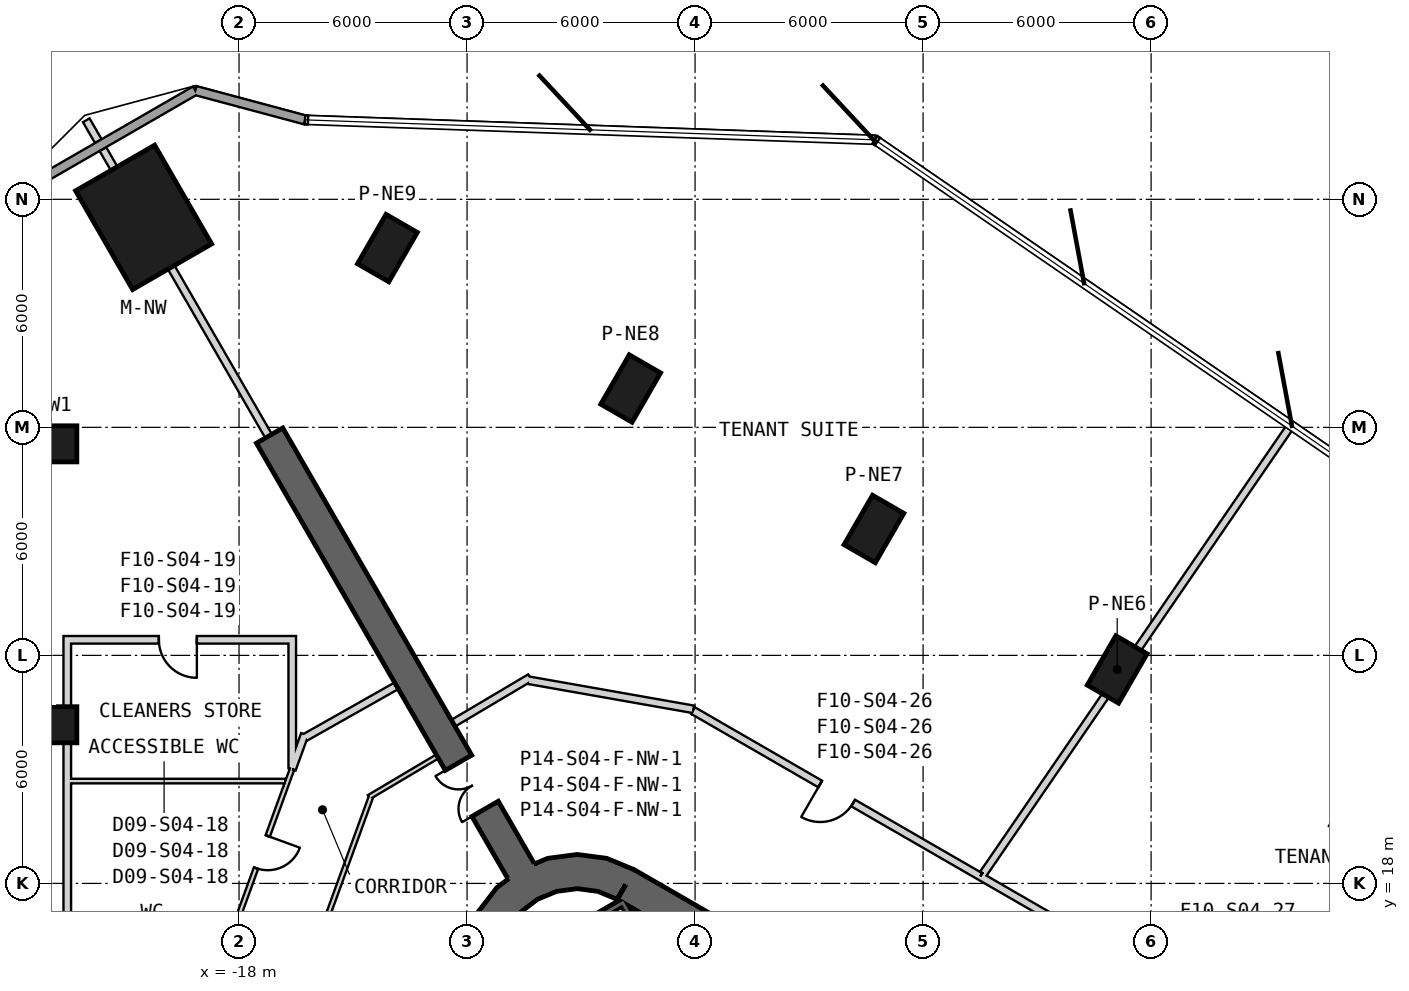
"""IFC4 building model, lengths in metres.
Left out: names, types, materials, properties, quantities, classifications, styles, units other than length and angle.
Written with IfcOpenShell. Run it as: python <this file> out.ifc"""

import sys

from ifc_helpers import new_model, si_unit, direction, frame, frame_2d, origin, origin_2d, place, context, subcontext, project, spatial, polyline, rectangle, outline, extrude, element, fill, save


model = new_model("IFC4")
c1 = context("Model", 3, precision=1e-05, world=origin(), true_north=direction((0.0, 1.0)))
c2 = subcontext(c1, "Body", "Model", "MODEL_VIEW")
j1 = project(units=[si_unit("LENGTHUNIT", "METRE"), si_unit("PLANEANGLEUNIT", "RADIAN")], contexts=[c1])
p1 = place(None, origin())
s1 = spatial("IfcSite", under=j1, at=p1, CompositionType="ELEMENT")
p2 = place(p1, origin())
s2 = spatial("IfcBuilding", under=s1, at=p2, CompositionType="ELEMENT")
p3 = place(p2, frame((0.0, 0.0, 94.7)))
s3 = spatial("IfcBuildingStorey", under=s2, at=p3, CompositionType="ELEMENT", Elevation=94.7)
p4 = place(p3, frame((-20.51, 35.525, 0.0), z_axis=(0.0, 0.0, 1.0), x_axis=(-0.5, 0.866025403784, 0.0)))
e1 = element("IfcColumn", 1, at=p4, inside=s3, PredefinedType="COLUMN", context=c2, shape_type="SweptSolid", body=[
    extrude(rectangle(XDim=3.0, YDim=2.4, at=origin_2d()), origin(), (0.0, 0.0, 1.0), 4.1),
])
for number, where, z_axis, x_axis in (
    (2, (-23.018, 29.566, 0.0), (0.0, 0.0, 1.0), (-1.0, 0.0, 0.0)),
    (3, (-23.018, 22.174, 0.0), (0.0, 0.0, 1.0), (-1.0, 0.0, 0.0)),
    (4, (5.108, 23.63, 0.0), (0.0, 0.0, 1.0), (0.5, 0.866, 0.0)),
    (5, (-1.293, 27.326, 0.0), (0.0, 0.0, 1.0), (0.5, 0.866, 0.0)),
    (6, (-7.695, 31.021, 0.0), (0.0, 0.0, 1.0), (0.5, 0.866, 0.0)),
    (7, (-14.096, 34.717, 0.0), (0.0, 0.0, 1.0), (0.5, 0.866, 0.0)),
):
    element("IfcColumn", number, at=place(p3, frame(where, z_axis=z_axis, x_axis=x_axis)), inside=s3, PredefinedType="COLUMN", context=c2, shape_type="SweptSolid", body=[
        extrude(rectangle(XDim=1.5, YDim=0.95, at=origin_2d()), origin(), (0.0, 0.0, 1.0), 4.1),
    ])
p5 = place(p3, frame((19.475, 2.208, 0.0), z_axis=(0.0, 0.0, 1.0), x_axis=(-0.866028369851, 0.499994862586, 0.0)))
e8 = element("IfcWall", 8, at=p5, inside=s3, PredefinedType="SHEAR", context=c2, shape_type="SweptSolid", body=[
    extrude(rectangle(XDim=31.523, YDim=0.9, at=frame_2d((15.762, 0.0))), origin(), (0.0, 0.0, 1.0), 4.1),
])
p6 = place(p5, frame((7.062, 0.0, 0.0)))
e9 = element("IfcOpeningElement", 9, at=p6, cuts=e8, PredefinedType="OPENING", context=c2, shape_type="SweptSolid", body=[
    extrude(rectangle(XDim=1.2, YDim=2.4, at=frame_2d((0.6, 1.2))), frame((0.0, 0.46, 0.0), z_axis=(0.0, -1.0, 0.0), x_axis=(1.0, 0.0, 0.0)), (0.0, 0.0, 1.0), 0.92),
])
p7 = place(p5, frame((9.762, 0.0, 0.0)))
e10 = element("IfcOpeningElement", 10, at=p7, cuts=e8, PredefinedType="OPENING", context=c2, shape_type="SweptSolid", body=[
    extrude(rectangle(XDim=1.2, YDim=2.4, at=frame_2d((0.6, 1.2))), frame((0.0, 0.46, 0.0), z_axis=(0.0, -1.0, 0.0), x_axis=(1.0, 0.0, 0.0)), (0.0, 0.0, 1.0), 0.92),
])
p8 = place(p5, frame((12.462, 0.0, 0.0)))
e11 = element("IfcOpeningElement", 11, at=p8, cuts=e8, PredefinedType="OPENING", context=c2, shape_type="SweptSolid", body=[
    extrude(rectangle(XDim=1.2, YDim=2.4, at=frame_2d((0.6, 1.2))), frame((0.0, 0.46, 0.0), z_axis=(0.0, -1.0, 0.0), x_axis=(1.0, 0.0, 0.0)), (0.0, 0.0, 1.0), 0.92),
])
p9 = place(p5, frame((15.162, 0.0, 0.0)))
e12 = element("IfcOpeningElement", 12, at=p9, cuts=e8, PredefinedType="OPENING", context=c2, shape_type="SweptSolid", body=[
    extrude(rectangle(XDim=1.2, YDim=2.4, at=frame_2d((0.6, 1.2))), frame((0.0, 0.46, 0.0), z_axis=(0.0, -1.0, 0.0), x_axis=(1.0, 0.0, 0.0)), (0.0, 0.0, 1.0), 0.92),
])
p10 = place(p5, frame((17.862, 0.0, 0.0)))
e13 = element("IfcOpeningElement", 13, at=p10, cuts=e8, PredefinedType="OPENING", context=c2, shape_type="SweptSolid", body=[
    extrude(rectangle(XDim=1.2, YDim=2.4, at=frame_2d((0.6, 1.2))), frame((0.0, 0.46, 0.0), z_axis=(0.0, -1.0, 0.0), x_axis=(1.0, 0.0, 0.0)), (0.0, 0.0, 1.0), 0.92),
])
p11 = place(p5, frame((20.562, 0.0, 0.0)))
e14 = element("IfcOpeningElement", 14, at=p11, cuts=e8, PredefinedType="OPENING", context=c2, shape_type="SweptSolid", body=[
    extrude(rectangle(XDim=1.2, YDim=2.4, at=frame_2d((0.6, 1.2))), frame((0.0, 0.46, 0.0), z_axis=(0.0, -1.0, 0.0), x_axis=(1.0, 0.0, 0.0)), (0.0, 0.0, 1.0), 0.92),
])
p12 = place(p5, frame((23.262, 0.0, 0.0)))
e15 = element("IfcOpeningElement", 15, at=p12, cuts=e8, PredefinedType="OPENING", context=c2, shape_type="SweptSolid", body=[
    extrude(rectangle(XDim=1.2, YDim=2.4, at=frame_2d((0.6, 1.2))), frame((0.0, 0.46, 0.0), z_axis=(0.0, -1.0, 0.0), x_axis=(1.0, 0.0, 0.0)), (0.0, 0.0, 1.0), 0.92),
])
p13 = place(p5, frame((3.612, 0.0, 0.0)))
e16 = element("IfcOpeningElement", 16, at=p13, cuts=e8, PredefinedType="OPENING", context=c2, shape_type="SweptSolid", body=[
    extrude(rectangle(XDim=1.2, YDim=2.4, at=frame_2d((0.6, 1.2))), frame((0.0, 0.46, 0.0), z_axis=(0.0, -1.0, 0.0), x_axis=(1.0, 0.0, 0.0)), (0.0, 0.0, 1.0), 0.92),
])
p14 = place(p5, frame((26.712, 0.0, 0.0)))
e17 = element("IfcOpeningElement", 17, at=p14, cuts=e8, PredefinedType="OPENING", context=c2, shape_type="SweptSolid", body=[
    extrude(rectangle(XDim=1.2, YDim=2.4, at=frame_2d((0.6, 1.2))), frame((0.0, 0.46, 0.0), z_axis=(0.0, -1.0, 0.0), x_axis=(1.0, 0.0, 0.0)), (0.0, 0.0, 1.0), 0.92),
])
p15 = place(p3, origin())
e18 = element("IfcWall", 18, at=p15, inside=s3, PredefinedType="SHEAR", context=c2, shape_type="SweptSolid", body=[
    extrude(outline(polyline([(-7.6, 18.36), (-8.323, 18.659), (-9.1, 18.762), (-9.876, 18.659), (-10.6, 18.36), (-11.221, 17.883), (-11.698, 17.262), (-11.998, 16.538), (-12.1, 15.762), (-11.2, 15.762), (-11.128, 16.305), (-10.919, 16.812), (-10.585, 17.247), (-10.15, 17.58), (-9.644, 17.79), (-9.1, 17.862), (-8.556, 17.79), (-8.05, 17.58), (-7.6, 18.36)])), origin(), (0.0, 0.0, 1.0), 4.1),
])
p16 = place(p3, frame((-10.575, 18.316, 0.0), z_axis=(0.0, 0.0, 1.0), x_axis=(-0.500006018292, 0.866021929094, 0.0)))
e19 = element("IfcWall", 19, at=p16, inside=s3, PredefinedType="SHEAR", context=c2, shape_type="SweptSolid", body=[
    extrude(rectangle(XDim=13.241, YDim=0.8, at=frame_2d((6.621, 0.0))), origin(), (0.0, 0.0, 1.0), 4.1),
])
p17 = place(p16, frame((1.9, 0.0, 0.0)))
e20 = element("IfcOpeningElement", 20, at=p17, cuts=e19, PredefinedType="OPENING", context=c2, shape_type="SweptSolid", body=[
    extrude(rectangle(XDim=1.4, YDim=2.4, at=frame_2d((0.7, 1.2))), frame((0.0, 0.41, 0.0), z_axis=(0.0, -1.0, 0.0), x_axis=(1.0, 0.0, 0.0)), (0.0, 0.0, 1.0), 0.82),
])
p18 = place(p3, frame((-16.263, 38.09, 0.0), z_axis=(0.0, 0.0, 1.0), x_axis=(-0.965934938286, 0.258785036271, 0.0)))
e21 = element("IfcWall", 21, at=p18, inside=s3, PredefinedType="SOLIDWALL", context=c2, shape_type="SweptSolid", body=[
    extrude(rectangle(XDim=2.991, YDim=0.24, at=frame_2d((1.496, 0.0))), origin(), (0.0, 0.0, 1.0), 3.8),
])
p19 = place(p3, frame((-19.153, 38.865, 0.0), z_axis=(0.0, 0.0, 1.0), x_axis=(-0.866024844342, -0.500000968981, 0.0)))
e22 = element("IfcWall", 22, at=p19, inside=s3, PredefinedType="SOLIDWALL", context=c2, shape_type="SweptSolid", body=[
    extrude(rectangle(XDim=5.691, YDim=0.24, at=frame_2d((2.845, 0.0))), origin(), (0.0, 0.0, 1.0), 3.8),
])
p20 = place(p3, frame((-7.818, 17.541, -0.3), z_axis=(0.0, 0.0, 1.0), x_axis=(-0.866044365799, -0.499967155389, 0.0)))
e23 = element("IfcWall", 23, at=p20, inside=s3, PredefinedType="SHEAR", context=c2, shape_type="SweptSolid", body=[
    extrude(rectangle(XDim=3.8, YDim=0.2, at=frame_2d((1.9, 0.0))), origin(), (0.0, 0.0, 1.0), 4.1),
])
p21 = place(p3, frame((-7.854, 17.405, -0.3), z_axis=(0.0, 0.0, 1.0), x_axis=(0.499997992926, -0.866026562566, 0.0)))
e24 = element("IfcWall", 24, at=p21, inside=s3, PredefinedType="SHEAR", context=c2, shape_type="SweptSolid", body=[
    extrude(rectangle(XDim=7.9, YDim=0.2, at=frame_2d((3.95, 0.0))), origin(), (0.0, 0.0, 1.0), 4.1),
])
p22 = place(p3, frame((-12.782, 21.339, 0.0), z_axis=(0.0, 0.0, 1.0), x_axis=(-0.859769901207, -0.510681619973, 0.0)))
e25 = element("IfcWall", 25, at=p22, inside=s3, PredefinedType="PARTITIONING", context=c2, shape_type="SweptSolid", body=[
    extrude(rectangle(XDim=2.093, YDim=0.12, at=frame_2d((1.046, 0.0))), origin(), (0.0, 0.0, 1.0), 3.8),
])
p23 = place(p3, frame((-14.528, 20.282, 0.0), z_axis=(0.0, 0.0, 1.0), x_axis=(-0.341969257767, -0.939711140054, 0.0)))
e26 = element("IfcWall", 26, at=p23, inside=s3, PredefinedType="PARTITIONING", context=c2, shape_type="SweptSolid", body=[
    extrude(rectangle(XDim=4.073, YDim=0.12, at=frame_2d((2.037, 0.0))), origin(), (0.0, 0.0, 1.0), 2.88),
])
p24 = place(p3, frame((-16.271, 21.923, 0.0), z_axis=(0.0, 0.0, 1.0), x_axis=(-0.342165073447, -0.939639857878, 0.0)))
e27 = element("IfcWall", 27, at=p24, inside=s3, PredefinedType="PARTITIONING", context=c2, shape_type="SweptSolid", body=[
    extrude(rectangle(XDim=0.975, YDim=0.2, at=frame_2d((0.488, 0.0))), origin(), (0.0, 0.0, 1.0), 2.88),
])
p25 = place(p3, frame((-13.856, 23.2, 0.0), z_axis=(0.0, 0.0, 1.0), x_axis=(-0.870639942446, -0.491920817426, 0.0)))
e28 = element("IfcWall", 28, at=p25, inside=s3, PredefinedType="PARTITIONING", context=c2, shape_type="SweptSolid", body=[
    extrude(rectangle(XDim=2.771, YDim=0.2, at=frame_2d((1.386, 0.0))), origin(), (0.0, 0.0, 1.0), 3.8),
])
p26 = place(p3, frame((-16.605, 21.006, 0.0), z_axis=(0.0, 0.0, 1.0), x_axis=(-0.342014101174, -0.939694819927, 0.0)))
e29 = element("IfcWall", 29, at=p26, inside=s3, PredefinedType="PARTITIONING", context=c2, shape_type="SweptSolid", body=[
    extrude(rectangle(XDim=4.628, YDim=0.12, at=frame_2d((2.314, 0.0))), origin(), (0.0, 0.0, 1.0), 2.98),
])
p27 = place(p26, frame((1.871, 0.0, 0.0)))
e30 = element("IfcOpeningElement", 30, at=p27, cuts=e29, PredefinedType="OPENING", context=c2, shape_type="SweptSolid", body=[
    extrude(rectangle(XDim=0.9, YDim=2.1, at=frame_2d((0.45, 1.05))), frame((0.0, 0.07, 0.0), z_axis=(0.0, -1.0, 0.0), x_axis=(1.0, 0.0, 0.0)), (0.0, 0.0, 1.0), 0.14),
])
p28 = place(p3, frame((-10.339, 23.415, 0.0), z_axis=(0.0, 0.0, 1.0), x_axis=(-0.860316803263, -0.509759745393, 0.0)))
e31 = element("IfcWall", 31, at=p28, inside=s3, PredefinedType="PARTITIONING", context=c2, shape_type="SweptSolid", body=[
    extrude(rectangle(XDim=2.354, YDim=0.2, at=frame_2d((1.177, 0.0))), origin(), (0.0, 0.0, 1.0), 3.8),
])
p29 = place(p3, frame((-6.042, 22.581, 0.0), z_axis=(0.0, 0.0, 1.0), x_axis=(-0.984805258509, 0.173662324106, 0.0)))
e32 = element("IfcWall", 32, at=p29, inside=s3, PredefinedType="PARTITIONING", context=c2, shape_type="SweptSolid", body=[
    extrude(rectangle(XDim=4.416, YDim=0.2, at=frame_2d((2.208, 0.0))), origin(), (0.0, 0.0, 1.0), 2.88),
])
p30 = place(p3, frame((13.031, 11.529, 0.0), z_axis=(0.0, 0.0, 1.0), x_axis=(-0.866023969537, 0.500002484181, 0.0)))
e33 = element("IfcWall", 33, at=p30, inside=s3, PredefinedType="PARTITIONING", context=c2, shape_type="SweptSolid", body=[
    extrude(rectangle(XDim=13.308, YDim=0.2, at=frame_2d((6.654, 0.0))), origin(), (0.0, 0.0, 1.0), 3.08),
])
p31 = place(p30, frame((6.142, 0.0, 0.0)))
e34 = element("IfcOpeningElement", 34, at=p31, cuts=e33, PredefinedType="OPENING", context=c2, shape_type="SweptSolid", body=[
    extrude(rectangle(XDim=1.0, YDim=2.1, at=frame_2d((0.5, 1.05))), frame((0.0, 0.11, 0.0), z_axis=(0.0, -1.0, 0.0), x_axis=(1.0, 0.0, 0.0)), (0.0, 0.0, 1.0), 0.22),
])
p32 = place(p3, frame((1.506, 18.183, 0.0), z_axis=(0.0, 0.0, 1.0), x_axis=(-0.866028170149, 0.499995208485, 0.0)))
e35 = element("IfcWall", 35, at=p32, inside=s3, PredefinedType="PARTITIONING", context=c2, shape_type="SweptSolid", body=[
    extrude(rectangle(XDim=8.729, YDim=0.2, at=frame_2d((4.365, 0.0))), origin(), (0.0, 0.0, 1.0), 2.98),
])
p33 = place(p32, frame((3.865, 0.0, 0.0)))
e36 = element("IfcOpeningElement", 36, at=p33, cuts=e35, PredefinedType="OPENING", context=c2, shape_type="SweptSolid", body=[
    extrude(rectangle(XDim=1.0, YDim=2.1, at=frame_2d((0.5, 1.05))), frame((0.0, 0.11, 0.0), z_axis=(0.0, -1.0, 0.0), x_axis=(1.0, 0.0, 0.0)), (0.0, 0.0, 1.0), 0.22),
])
p34 = place(p3, frame((-17.221, 29.768, 0.0), z_axis=(0.0, 0.0, 1.0), x_axis=(-0.499998470576, 0.866026286796, 0.0)))
e37 = element("IfcWall", 37, at=p34, inside=s3, PredefinedType="PARTITIONING", context=c2, shape_type="SweptSolid", body=[
    extrude(rectangle(XDim=5.13, YDim=0.2, at=frame_2d((2.565, 0.0))), origin(), (0.0, 0.0, 1.0), 3.37),
])
p35 = place(p3, frame((-21.286, 36.809, 0.0), z_axis=(0.0, 0.0, 1.0), x_axis=(-0.500078724409, 0.865979947454, 0.0)))
e38 = element("IfcWall", 38, at=p35, inside=s3, PredefinedType="PARTITIONING", context=c2, shape_type="SweptSolid", body=[
    extrude(rectangle(XDim=0.593, YDim=0.2, at=frame_2d((0.297, 0.0))), origin(), (0.0, 0.0, 1.0), 3.8),
])
p36 = place(p3, frame((-21.703, 37.531, 0.0), z_axis=(0.0, 0.0, 1.0), x_axis=(-0.499988999718, 0.866031754707, 0.0)))
e39 = element("IfcWall", 39, at=p36, inside=s3, PredefinedType="PARTITIONING", context=c2, shape_type="SweptSolid", body=[
    extrude(rectangle(XDim=0.634, YDim=0.2, at=frame_2d((0.317, 0.0))), origin(), (0.0, 0.0, 1.0), 3.8),
])
p37 = place(p3, frame((-22.52, 16.597, 0.0), z_axis=(0.0, 0.0, 1.0), x_axis=(0.0, 1.0, 0.0)))
e40 = element("IfcWall", 40, at=p37, inside=s3, PredefinedType="PARTITIONING", context=c2, shape_type="SweptSolid", body=[
    extrude(rectangle(XDim=4.095, YDim=0.2, at=frame_2d((2.048, 0.0))), origin(), (0.0, 0.0, 1.0), 3.8),
])
p38 = place(p3, frame((-22.52, 20.692, 0.0), z_axis=(0.0, 0.0, 1.0), x_axis=(0.0, 1.0, 0.0)))
e41 = element("IfcWall", 41, at=p38, inside=s3, PredefinedType="PARTITIONING", context=c2, shape_type="SweptSolid", body=[
    extrude(rectangle(XDim=3.618, YDim=0.2, at=frame_2d((1.809, 0.0))), origin(), (0.0, 0.0, 1.0), 2.98),
])
p39 = place(p3, frame((-16.6, 21.036, 0.0), z_axis=(0.0, 0.0, 1.0), x_axis=(0.0, 1.0, 0.0)))
e42 = element("IfcWall", 42, at=p39, inside=s3, PredefinedType="PARTITIONING", context=c2, shape_type="SweptSolid", body=[
    extrude(rectangle(XDim=3.474, YDim=0.2, at=frame_2d((1.737, 0.0))), origin(), (0.0, 0.0, 1.0), 2.88),
])
p40 = place(p3, frame((-16.7, 24.41, 0.0), z_axis=(0.0, 0.0, 1.0), x_axis=(-1.0, 0.0, 0.0)))
e43 = element("IfcWall", 43, at=p40, inside=s3, PredefinedType="PARTITIONING", context=c2, shape_type="SweptSolid", body=[
    extrude(rectangle(XDim=5.92, YDim=0.2, at=frame_2d((2.96, 0.0))), origin(), (0.0, 0.0, 1.0), 2.88),
])
p41 = place(p40, frame((2.41, 0.0, 0.0)))
e44 = element("IfcOpeningElement", 44, at=p41, cuts=e43, PredefinedType="OPENING", context=c2, shape_type="SweptSolid", body=[
    extrude(rectangle(XDim=1.0, YDim=2.1, at=frame_2d((0.5, 1.05))), frame((0.0, 0.11, 0.0), z_axis=(0.0, -1.0, 0.0), x_axis=(1.0, 0.0, 0.0)), (0.0, 0.0, 1.0), 0.22),
])
p42 = place(p3, frame((1.584, 18.254, 0.0), z_axis=(0.0, 0.0, 1.0), x_axis=(0.565874790915, 0.824491189163, 0.0)))
e45 = element("IfcWall", 45, at=p42, inside=s3, PredefinedType="PARTITIONING", context=c2, shape_type="SweptSolid", body=[
    extrude(rectangle(XDim=14.31, YDim=0.2, at=frame_2d((7.155, 0.0))), origin(), (0.0, 0.0, 1.0), 3.08),
])
p43 = place(p3, frame((-22.42, 20.692, 0.0), z_axis=(0.0, 0.0, 1.0), x_axis=(1.0, 0.0, 0.0)))
e46 = element("IfcWall", 46, at=p43, inside=s3, PredefinedType="PARTITIONING", context=c2, shape_type="SweptSolid", body=[
    extrude(rectangle(XDim=5.637, YDim=0.12, at=frame_2d((2.818, 0.0))), origin(), (0.0, 0.0, 1.0), 2.98),
])
p44 = place(p27, origin())
e47 = element("IfcDoor", 47, at=p44, inside=s3, OperationType="SINGLE_SWING_LEFT", PredefinedType="NOTDEFINED", context=c2, shape_type="SweptSolid", body=[
    extrude(rectangle(XDim=0.9, YDim=2.1, at=frame_2d((0.45, 1.05))), frame((0.0, 0.025, 0.0), z_axis=(0.0, -1.0, 0.0), x_axis=(1.0, 0.0, 0.0)), (0.0, 0.0, 1.0), 0.05),
])
fill(e30, e47)
p45 = place(p41, origin())
e48 = element("IfcDoor", 48, at=p45, inside=s3, OperationType="SINGLE_SWING_LEFT", PredefinedType="USERDEFINED", context=c2, shape_type="SweptSolid", body=[
    extrude(rectangle(XDim=1.0, YDim=2.1, at=frame_2d((0.5, 1.05))), frame((0.0, 0.025, 0.0), z_axis=(0.0, -1.0, 0.0), x_axis=(1.0, 0.0, 0.0)), (0.0, 0.0, 1.0), 0.05),
])
fill(e44, e48)
p46 = place(p33, origin())
e49 = element("IfcDoor", 49, at=p46, inside=s3, OperationType="SINGLE_SWING_LEFT", PredefinedType="USERDEFINED", context=c2, shape_type="SweptSolid", body=[
    extrude(rectangle(XDim=1.0, YDim=2.1, at=frame_2d((0.5, 1.05))), frame((0.0, 0.025, 0.0), z_axis=(0.0, -1.0, 0.0), x_axis=(1.0, 0.0, 0.0)), (0.0, 0.0, 1.0), 0.05),
])
fill(e36, e49)
p47 = place(p17, origin())
e50 = element("IfcDoor", 50, at=p47, inside=s3, OperationType="DOUBLE_DOOR_SINGLE_SWING", PredefinedType="NOTDEFINED", context=c2, shape_type="SweptSolid", body=[
    extrude(rectangle(XDim=1.4, YDim=2.4, at=frame_2d((0.7, 1.2))), frame((0.0, 0.025, 0.0), z_axis=(0.0, -1.0, 0.0), x_axis=(1.0, 0.0, 0.0)), (0.0, 0.0, 1.0), 0.05),
])
fill(e20, e50)
save(model, sys.argv[1])
